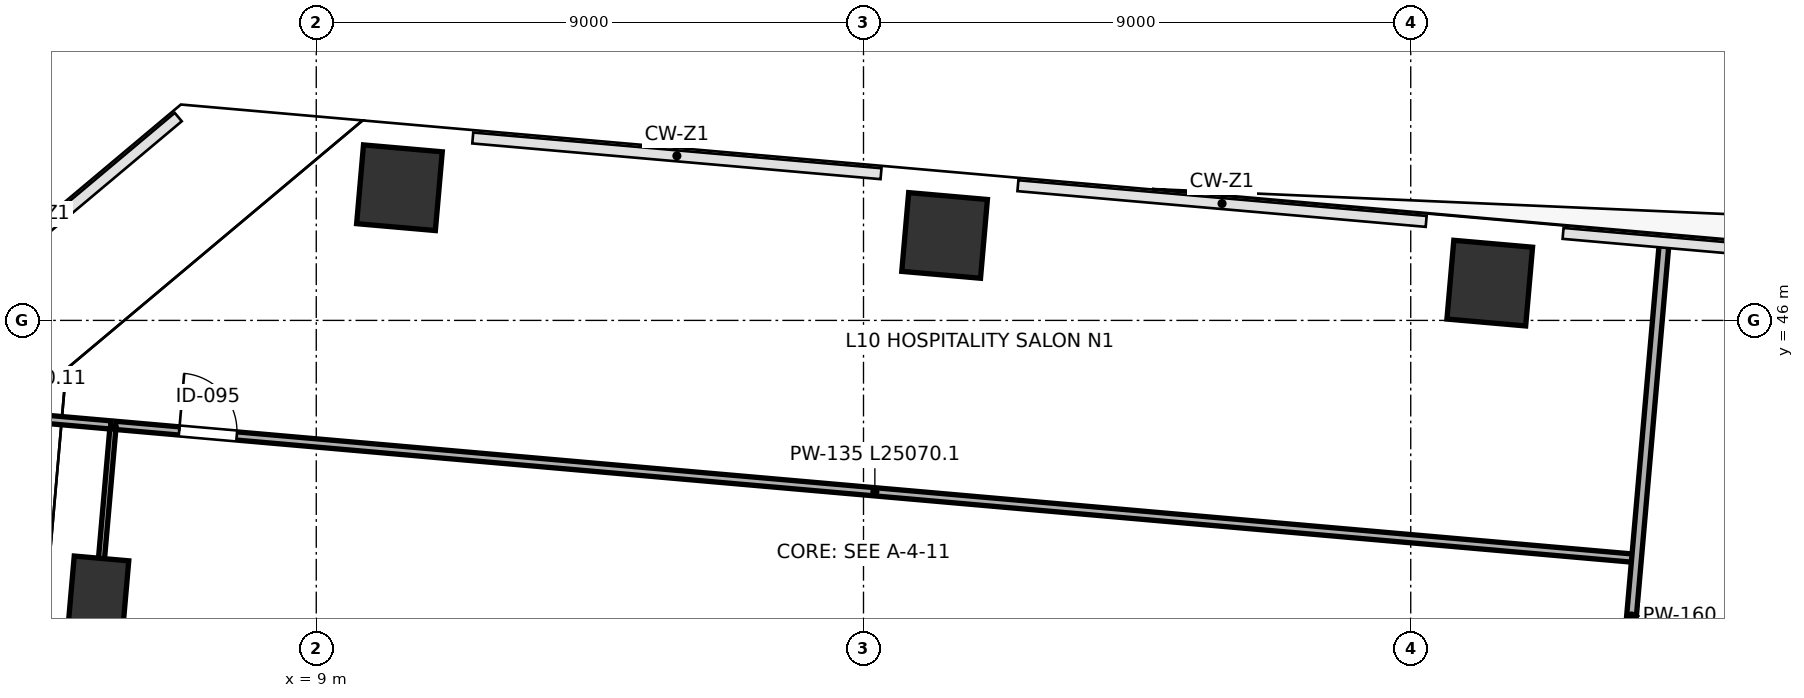
"""IFC4 building model, lengths in metres.
Left out: names, types, materials, properties, quantities, classifications, styles, units other than length and angle.
Written with IfcOpenShell. Run it as: python <this file> out.ifc"""

import sys

from ifc_helpers import new_model, si_unit, direction, frame, frame_2d, origin, origin_2d, place, context, subcontext, project, spatial, rectangle, extrude, source, transform, mapped, element, fill, save


model = new_model("IFC4")
c1 = context("Model", 3, precision=1e-05, world=origin(), true_north=direction((0.0, 1.0)))
c2 = subcontext(c1, "Body", "Model", "MODEL_VIEW")
j1 = project(units=[si_unit("LENGTHUNIT", "METRE"), si_unit("PLANEANGLEUNIT", "RADIAN")], contexts=[c1])
p1 = place(None, origin())
s1 = spatial("IfcSite", under=j1, at=p1, CompositionType="ELEMENT")
p2 = place(p1, origin())
s2 = spatial("IfcBuilding", under=s1, at=p2, CompositionType="ELEMENT")
p3 = place(p2, frame((0.0, 0.0, 47.2)))
s3 = spatial("IfcBuildingStorey", under=s2, at=p3, CompositionType="ELEMENT", Elevation=47.2)
m1 = source(origin(), c2, "Body", "SweptSolid", [
    extrude(rectangle(XDim=1.3, YDim=1.3, at=origin_2d()), origin(), (0.0, 0.0, 1.0), 4.799),
])
for number, where, z_axis, x_axis in (
    (1, (10.368, 48.182, 0.001), (0.0, 0.0, 1.0), (-0.996, 0.087, 0.0)),
    (2, (19.334, 47.397, 0.001), (0.0, 0.0, 1.0), (-0.996, 0.087, 0.0)),
    (3, (28.3, 46.613, 0.001), (0.0, 0.0, 1.0), (-0.996, 0.087, 0.0)),
):
    element("IfcColumn", number, at=place(p3, frame(where, z_axis=z_axis, x_axis=x_axis)), inside=s3, PredefinedType="COLUMN", context=c2, shape_type="MappedRepresentation", body=[
        mapped(m1, transform((0.0, 0.0, 0.0), scale=1.0)),
    ])
m2 = source(origin(), c2, "Body", "SweptSolid", [
    extrude(rectangle(XDim=0.9, YDim=1.3, at=origin_2d()), origin(), (0.0, 0.0, 1.0), 4.799),
])
p4 = place(p3, frame((5.411, 41.438, 0.001), z_axis=(0.0, 0.0, 1.0), x_axis=(-0.996194698092, 0.087155742748, 0.0)))
e4 = element("IfcColumn", 4, at=p4, inside=s3, PredefinedType="PILASTER", context=c2, shape_type="MappedRepresentation", body=[
    mapped(m2, transform((0.0, 0.0, 0.0), scale=1.0)),
])
p5 = place(p3, frame((5.7, 44.274, 0.0), z_axis=(0.0, 0.0, 1.0), x_axis=(0.996195324028, -0.087148587968, 0.0)))
e5 = element("IfcWall", 5, at=p5, inside=s3, PredefinedType="PARTITIONING", context=c2, shape_type="SweptSolid", body=[
    extrude(rectangle(XDim=25.07, YDim=0.135, at=frame_2d((12.535, 0.0))), origin(), (0.0, 0.0, 1.0), 4.56),
])
p6 = place(p5, frame((1.05, 0.0, 0.0)))
e6 = element("IfcOpeningElement", 6, at=p6, cuts=e5, PredefinedType="OPENING", context=c2, shape_type="SweptSolid", body=[
    extrude(rectangle(XDim=0.95, YDim=2.15, at=frame_2d((0.475, 1.075))), frame((0.0, 0.078, 0.0), z_axis=(0.0, -1.0, 0.0), x_axis=(1.0, 0.0, 0.0)), (0.0, 0.0, 1.0), 0.155),
])
p7 = place(p3, frame((3.61, 20.847, 0.0), z_axis=(0.0, 0.0, 1.0), x_axis=(0.087153664928, 0.996194879875, 0.0)))
e7 = element("IfcWall", 7, at=p7, inside=s3, PredefinedType="PARTITIONING", context=c2, shape_type="SweptSolid", body=[
    extrude(rectangle(XDim=23.48, YDim=0.1, at=frame_2d((11.74, 0.0))), origin(), (0.0, 0.0, 1.0), 3.395),
])
p8 = place(p7, frame((7.0, 0.0, 0.0)))
e8 = element("IfcOpeningElement", 8, at=p8, cuts=e7, PredefinedType="OPENING", context=c2, shape_type="SweptSolid", body=[
    extrude(rectangle(XDim=0.95, YDim=2.15, at=frame_2d((0.475, 1.075))), frame((0.0, 0.06, 0.0), z_axis=(0.0, -1.0, 0.0), x_axis=(1.0, 0.0, 0.0)), (0.0, 0.0, 1.0), 0.12),
])
p9 = place(p3, frame((2.004, 44.597, 0.0), z_axis=(0.0, 0.0, 1.0), x_axis=(0.996194520424, -0.087157773474, 0.0)))
e9 = element("IfcWall", 9, at=p9, inside=s3, PredefinedType="PARTITIONING", context=c2, shape_type="SweptSolid", body=[
    extrude(rectangle(XDim=3.63, YDim=0.135, at=frame_2d((1.815, 0.0))), origin(), (0.0, 0.0, 1.0), 4.56),
])
p10 = place(p3, frame((30.098, 35.042, 0.0), z_axis=(0.0, 0.0, 1.0), x_axis=(0.087145176091, 0.996195622498, 0.0)))
e10 = element("IfcWall", 10, at=p10, inside=s3, PredefinedType="PARTITIONING", context=c2, shape_type="SweptSolid", body=[
    extrude(rectangle(XDim=12.24, YDim=0.16, at=frame_2d((6.12, 0.0))), origin(), (0.0, 0.0, 1.0), 3.695),
])
m3 = source(origin(), c2, "Body", "SweptSolid", [
    extrude(rectangle(XDim=0.95, YDim=2.15, at=frame_2d((0.475, 1.075))), frame((0.0, 0.025, 0.0), z_axis=(0.0, -1.0, 0.0), x_axis=(1.0, 0.0, 0.0)), (0.0, 0.0, 1.0), 0.05),
])
p11 = place(p6, origin())
e11 = element("IfcDoor", 11, at=p11, inside=s3, OperationType="SINGLE_SWING_LEFT", PredefinedType="DOOR", context=c2, shape_type="MappedRepresentation", body=[
    mapped(m3, transform((0.0, 0.0, 0.0), scale=1.0)),
])
fill(e6, e11)
save(model, sys.argv[1])
